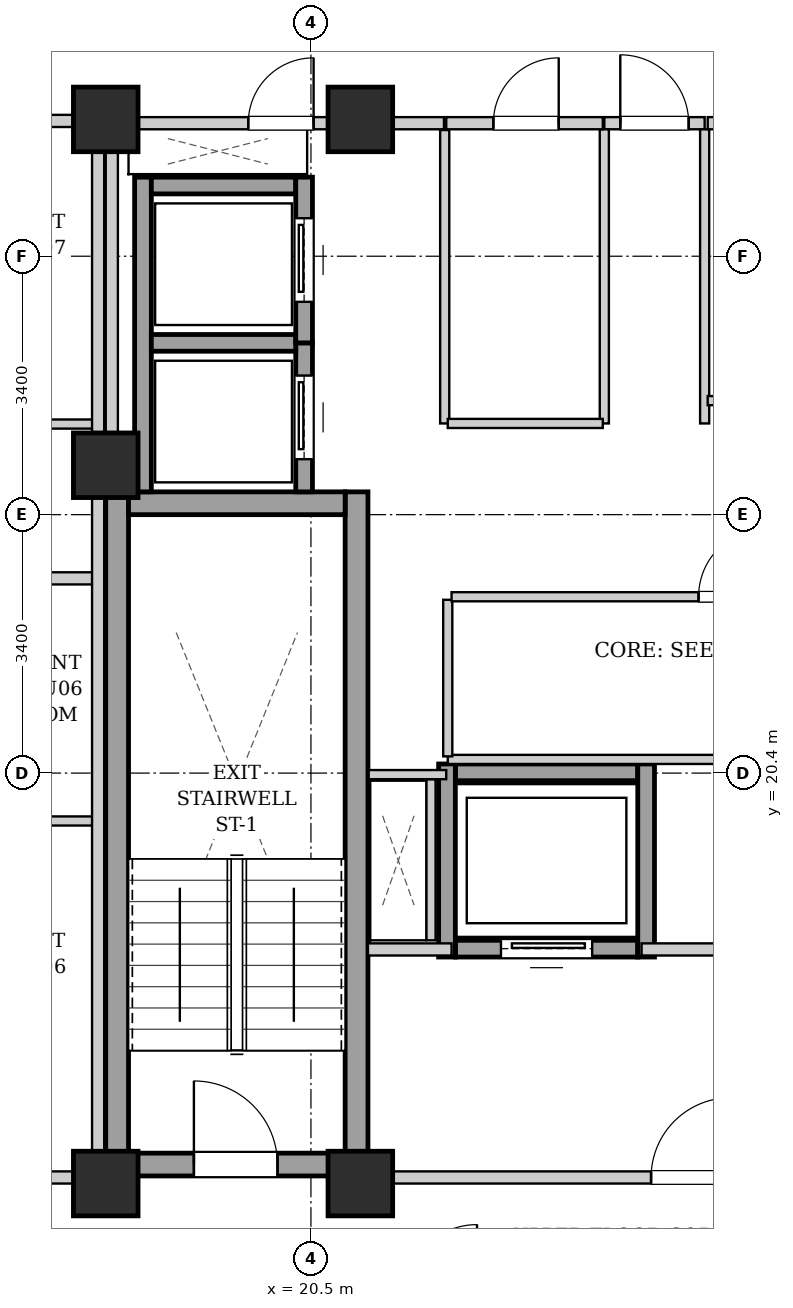
"""IFC4 building model, lengths in metres.
Left out: names, types, materials, properties, quantities, classifications, styles, units other than length and angle.
Written with IfcOpenShell. Run it as: python <this file> out.ifc"""

import sys

from ifc_helpers import new_model, si_unit, direction, frame, frame_2d, origin, origin_2d, place, context, subcontext, project, spatial, rectangle, extrude, element, fill, save


model = new_model("IFC4")
c1 = context("Model", 3, precision=1e-05, world=origin(), true_north=direction((0.0, 1.0)))
c2 = subcontext(c1, "Body", "Model", "MODEL_VIEW")
j1 = project(units=[si_unit("LENGTHUNIT", "METRE"), si_unit("PLANEANGLEUNIT", "RADIAN")], contexts=[c1])
p1 = place(None, origin())
s1 = spatial("IfcSite", under=j1, at=p1, CompositionType="ELEMENT")
p2 = place(p1, origin())
s2 = spatial("IfcBuilding", under=s1, at=p2, CompositionType="ELEMENT")
p3 = place(p2, frame((0.0, 0.0, 207.4)))
s3 = spatial("IfcBuildingStorey", under=s2, at=p3, CompositionType="ELEMENT", Elevation=207.4)
for number, where, z_axis, x_axis in (
    (1, (17.8, 15.0, 0.0), (0.0, 0.0, 1.0), (1.0, 0.0, 0.0)),
    (2, (21.15, 15.0, 0.0), (0.0, 0.0, 1.0), (1.0, 0.0, 0.0)),
    (3, (17.8, 29.0, 0.0), (0.0, 0.0, 1.0), (1.0, 0.0, 0.0)),
    (4, (21.15, 29.0, 0.0), (0.0, 0.0, 1.0), (1.0, 0.0, 0.0)),
    (5, (17.8, 24.45, 0.0), (0.0, 0.0, 1.0), (1.0, 0.0, 0.0)),
):
    element("IfcColumn", number, at=place(p3, frame(where, z_axis=z_axis, x_axis=x_axis)), inside=s3, PredefinedType="COLUMN", context=c2, shape_type="SweptSolid", body=[
        extrude(rectangle(XDim=0.85, YDim=0.85, at=origin_2d()), origin(), (0.0, 0.0, 1.0), 3.3),
    ])
for number, where, z_axis, x_axis in (
    (6, (17.95, 15.1, 0.0), (0.0, 0.0, 1.0), (0.0, 1.0, 0.0)),
    (7, (21.1, 15.1, 0.0), (0.0, 0.0, 1.0), (0.0, 1.0, 0.0)),
):
    element("IfcWall", number, at=place(p3, frame(where, z_axis=z_axis, x_axis=x_axis)), inside=s3, PredefinedType="SHEAR", context=c2, shape_type="SweptSolid", body=[
        extrude(rectangle(XDim=9.0, YDim=0.3, at=frame_2d((4.5, 0.0))), origin(), (0.0, 0.0, 1.0), 3.04),
    ])
p4 = place(p3, frame((18.1, 23.95, 0.0), z_axis=(0.0, 0.0, 1.0), x_axis=(1.0, 0.0, 0.0)))
e8 = element("IfcWall", 8, at=p4, inside=s3, PredefinedType="SHEAR", context=c2, shape_type="SweptSolid", body=[
    extrude(rectangle(XDim=2.85, YDim=0.3, at=frame_2d((1.425, 0.0))), origin(), (0.0, 0.0, 1.0), 3.04),
])
p5 = place(p3, frame((18.1, 15.25, 0.0), z_axis=(0.0, 0.0, 1.0), x_axis=(1.0, 0.0, 0.0)))
e9 = element("IfcWall", 9, at=p5, inside=s3, PredefinedType="SHEAR", context=c2, shape_type="SweptSolid", body=[
    extrude(rectangle(XDim=2.85, YDim=0.3, at=frame_2d((1.425, 0.0))), origin(), (0.0, 0.0, 1.0), 3.04),
])
p6 = place(p5, frame((0.86, 0.0, 0.0)))
e10 = element("IfcOpeningElement", 10, at=p6, cuts=e9, PredefinedType="OPENING", context=c2, shape_type="SweptSolid", body=[
    extrude(rectangle(XDim=1.1, YDim=2.05, at=frame_2d((0.55, 1.025))), frame((0.0, 0.16, 0.0), z_axis=(0.0, -1.0, 0.0), x_axis=(1.0, 0.0, 0.0)), (0.0, 0.0, 1.0), 0.32),
])
p7 = place(p3, frame((18.29, 24.1, 0.0), z_axis=(0.0, 0.0, 1.0), x_axis=(0.0, 1.0, 0.0)))
e11 = element("IfcWall", 11, at=p7, inside=s3, PredefinedType="SHEAR", context=c2, shape_type="SweptSolid", body=[
    extrude(rectangle(XDim=4.14, YDim=0.22, at=frame_2d((2.07, 0.0))), origin(), (0.0, 0.0, 1.0), 3.04),
])
p8 = place(p3, frame((20.41, 24.1, 0.0), z_axis=(0.0, 0.0, 1.0), x_axis=(0.0, 1.0, 0.0)))
e12 = element("IfcWall", 12, at=p8, inside=s3, PredefinedType="SHEAR", context=c2, shape_type="SweptSolid", body=[
    extrude(rectangle(XDim=1.96, YDim=0.22, at=frame_2d((0.98, 0.0))), origin(), (0.0, 0.0, 1.0), 3.04),
])
p9 = place(p8, frame((0.43, 0.0, 0.0)))
e13 = element("IfcOpeningElement", 13, at=p9, cuts=e12, PredefinedType="OPENING", context=c2, shape_type="SweptSolid", body=[
    extrude(rectangle(XDim=1.1, YDim=2.15, at=frame_2d((0.55, 1.075))), frame((0.0, 0.12, 0.0), z_axis=(0.0, -1.0, 0.0), x_axis=(1.0, 0.0, 0.0)), (0.0, 0.0, 1.0), 0.24),
])
for number, where, z_axis, x_axis in (
    (14, (18.4, 26.06, 0.0), (0.0, 0.0, 1.0), (1.0, 0.0, 0.0)),
    (15, (18.4, 28.13, 0.0), (0.0, 0.0, 1.0), (1.0, 0.0, 0.0)),
):
    element("IfcWall", number, at=place(p3, frame(where, z_axis=z_axis, x_axis=x_axis)), inside=s3, PredefinedType="SHEAR", context=c2, shape_type="SweptSolid", body=[
        extrude(rectangle(XDim=1.9, YDim=0.22, at=frame_2d((0.95, 0.0))), origin(), (0.0, 0.0, 1.0), 3.04),
    ])
p10 = place(p3, frame((20.41, 26.06, 0.0), z_axis=(0.0, 0.0, 1.0), x_axis=(0.0, 1.0, 0.0)))
e16 = element("IfcWall", 16, at=p10, inside=s3, PredefinedType="SHEAR", context=c2, shape_type="SweptSolid", body=[
    extrude(rectangle(XDim=2.18, YDim=0.22, at=frame_2d((1.09, 0.0))), origin(), (0.0, 0.0, 1.0), 3.04),
])
p11 = place(p10, frame((0.54, 0.0, 0.0)))
e17 = element("IfcOpeningElement", 17, at=p11, cuts=e16, PredefinedType="OPENING", context=c2, shape_type="SweptSolid", body=[
    extrude(rectangle(XDim=1.1, YDim=2.15, at=frame_2d((0.55, 1.075))), frame((0.0, 0.12, 0.0), z_axis=(0.0, -1.0, 0.0), x_axis=(1.0, 0.0, 0.0)), (0.0, 0.0, 1.0), 0.24),
])
p12 = place(p3, frame((22.4, 18.09, 0.0), z_axis=(0.0, 0.0, 1.0), x_axis=(1.0, 0.0, 0.0)))
e18 = element("IfcWall", 18, at=p12, inside=s3, PredefinedType="SHEAR", context=c2, shape_type="SweptSolid", body=[
    extrude(rectangle(XDim=2.4, YDim=0.22, at=frame_2d((1.2, 0.0))), origin(), (0.0, 0.0, 1.0), 3.04),
])
p13 = place(p12, frame((0.6, 0.0, 0.0)))
e19 = element("IfcOpeningElement", 19, at=p13, cuts=e18, PredefinedType="OPENING", context=c2, shape_type="SweptSolid", body=[
    extrude(rectangle(XDim=1.2, YDim=2.15, at=frame_2d((0.6, 1.075))), frame((0.0, 0.12, 0.0), z_axis=(0.0, -1.0, 0.0), x_axis=(1.0, 0.0, 0.0)), (0.0, 0.0, 1.0), 0.24),
])
p14 = place(p3, frame((22.4, 20.41, 0.0), z_axis=(0.0, 0.0, 1.0), x_axis=(1.0, 0.0, 0.0)))
e20 = element("IfcWall", 20, at=p14, inside=s3, PredefinedType="SHEAR", context=c2, shape_type="SweptSolid", body=[
    extrude(rectangle(XDim=2.4, YDim=0.22, at=frame_2d((1.2, 0.0))), origin(), (0.0, 0.0, 1.0), 3.04),
])
for number, where, z_axis, x_axis in (
    (21, (22.29, 17.98, 0.0), (0.0, 0.0, 1.0), (0.0, 1.0, 0.0)),
    (22, (24.91, 17.98, 0.0), (0.0, 0.0, 1.0), (0.0, 1.0, 0.0)),
):
    element("IfcWall", number, at=place(p3, frame(where, z_axis=z_axis, x_axis=x_axis)), inside=s3, PredefinedType="SHEAR", context=c2, shape_type="SweptSolid", body=[
        extrude(rectangle(XDim=2.54, YDim=0.22, at=frame_2d((1.27, 0.0))), origin(), (0.0, 0.0, 1.0), 3.04),
    ])
p15 = place(p3, frame((21.25, 15.08, 0.0), z_axis=(0.0, 0.0, 1.0), x_axis=(1.0, 0.0, 0.0)))
e23 = element("IfcWall", 23, at=p15, inside=s3, PredefinedType="PARTITIONING", context=c2, shape_type="SweptSolid", body=[
    extrude(rectangle(XDim=8.5, YDim=0.16, at=frame_2d((4.25, 0.0))), origin(), (0.0, 0.0, 1.0), 2.556),
])
p16 = place(p15, frame((3.725, 0.0, 0.0)))
e24 = element("IfcOpeningElement", 24, at=p16, cuts=e23, PredefinedType="OPENING", context=c2, shape_type="SweptSolid", body=[
    extrude(rectangle(XDim=1.05, YDim=2.05, at=frame_2d((0.525, 1.025))), frame((0.0, 0.09, 0.0), z_axis=(0.0, -1.0, 0.0), x_axis=(1.0, 0.0, 0.0)), (0.0, 0.0, 1.0), 0.18),
])
p17 = place(p3, frame((21.25, 18.08, 0.0), z_axis=(0.0, 0.0, 1.0), x_axis=(1.0, 0.0, 0.0)))
e25 = element("IfcWall", 25, at=p17, inside=s3, PredefinedType="PARTITIONING", context=c2, shape_type="SweptSolid", body=[
    extrude(rectangle(XDim=1.1, YDim=0.16, at=frame_2d((0.55, 0.0))), origin(), (0.0, 0.0, 1.0), 3.04),
])
p18 = place(p3, frame((24.85, 18.08, 0.0), z_axis=(0.0, 0.0, 1.0), x_axis=(1.0, 0.0, 0.0)))
e26 = element("IfcWall", 26, at=p18, inside=s3, PredefinedType="PARTITIONING", context=c2, shape_type="SweptSolid", body=[
    extrude(rectangle(XDim=1.3, YDim=0.16, at=frame_2d((0.65, 0.0))), origin(), (0.0, 0.0, 1.0), 3.04),
])
p19 = place(p3, frame((17.88, 24.12, 0.0), z_axis=(0.0, 0.0, 1.0), x_axis=(0.0, 1.0, 0.0)))
e27 = element("IfcWall", 27, at=p19, inside=s3, PredefinedType="PARTITIONING", context=c2, shape_type="SweptSolid", body=[
    extrude(rectangle(XDim=4.76, YDim=0.16, at=frame_2d((2.38, 0.0))), origin(), (0.0, 0.0, 1.0), 2.375),
])
p20 = place(p3, frame((24.36, 28.95, 0.0), z_axis=(0.0, 0.0, 1.0), x_axis=(1.0, 0.0, 0.0)))
e28 = element("IfcWall", 28, at=p20, inside=s3, PredefinedType="PARTITIONING", context=c2, shape_type="SweptSolid", body=[
    extrude(rectangle(XDim=1.32, YDim=0.16, at=frame_2d((0.66, 0.0))), origin(), (0.0, 0.0, 1.0), 2.556),
])
p21 = place(p20, frame((0.21, 0.0, 0.0)))
e29 = element("IfcOpeningElement", 29, at=p21, cuts=e28, PredefinedType="OPENING", context=c2, shape_type="SweptSolid", body=[
    extrude(rectangle(XDim=0.9, YDim=2.05, at=frame_2d((0.45, 1.025))), frame((0.0, 0.09, 0.0), z_axis=(0.0, -1.0, 0.0), x_axis=(1.0, 0.0, 0.0)), (0.0, 0.0, 1.0), 0.18),
])
p22 = place(p3, frame((17.96, 28.95, 0.0), z_axis=(0.0, 0.0, 1.0), x_axis=(1.0, 0.0, 0.0)))
e30 = element("IfcWall", 30, at=p22, inside=s3, PredefinedType="PARTITIONING", context=c2, shape_type="SweptSolid", body=[
    extrude(rectangle(XDim=4.29, YDim=0.16, at=frame_2d((2.145, 0.0))), origin(), (0.0, 0.0, 1.0), 2.556),
])
p23 = place(p22, frame((1.715, 0.0, 0.0)))
e31 = element("IfcOpeningElement", 31, at=p23, cuts=e30, PredefinedType="OPENING", context=c2, shape_type="SweptSolid", body=[
    extrude(rectangle(XDim=0.86, YDim=2.05, at=frame_2d((0.43, 1.025))), frame((0.0, 0.09, 0.0), z_axis=(0.0, -1.0, 0.0), x_axis=(1.0, 0.0, 0.0)), (0.0, 0.0, 1.0), 0.18),
])
p24 = place(p3, frame((22.08, 18.2, 0.0), z_axis=(0.0, 0.0, 1.0), x_axis=(0.0, 1.0, 0.0)))
e32 = element("IfcWall", 32, at=p24, inside=s3, PredefinedType="PARTITIONING", context=c2, shape_type="SweptSolid", body=[
    extrude(rectangle(XDim=2.12, YDim=0.12, at=frame_2d((1.06, 0.0))), origin(), (0.0, 0.0, 1.0), 3.04),
])
p25 = place(p3, frame((22.28, 20.38, 0.0), z_axis=(0.0, 0.0, 1.0), x_axis=(-1.0, 0.0, 0.0)))
e33 = element("IfcWall", 33, at=p25, inside=s3, PredefinedType="PARTITIONING", context=c2, shape_type="SweptSolid", body=[
    extrude(rectangle(XDim=1.02, YDim=0.12, at=frame_2d((0.51, 0.0))), origin(), (0.0, 0.0, 1.0), 3.04),
])
for number, where, z_axis, x_axis in (
    (34, (24.36, 25.0, 0.0), (0.0, 0.0, 1.0), (0.0, 1.0, 0.0)),
    (35, (25.68, 25.0, 0.0), (0.0, 0.0, 1.0), (0.0, 1.0, 0.0)),
):
    element("IfcWall", number, at=place(p3, frame(where, z_axis=z_axis, x_axis=x_axis)), inside=s3, PredefinedType="PARTITIONING", context=c2, shape_type="SweptSolid", body=[
        extrude(rectangle(XDim=3.87, YDim=0.12, at=frame_2d((1.935, 0.0))), origin(), (0.0, 0.0, 1.0), 3.04),
    ])
p26 = place(p3, frame((22.26, 25.0, 0.0), z_axis=(0.0, 0.0, 1.0), x_axis=(0.0, 1.0, 0.0)))
e36 = element("IfcWall", 36, at=p26, inside=s3, PredefinedType="PARTITIONING", context=c2, shape_type="SweptSolid", body=[
    extrude(rectangle(XDim=3.86, YDim=0.12, at=frame_2d((1.93, 0.0))), origin(), (0.0, 0.0, 1.0), 3.04),
])
p27 = place(p3, frame((22.3, 25.0, 0.0), z_axis=(0.0, 0.0, 1.0), x_axis=(1.0, 0.0, 0.0)))
e37 = element("IfcWall", 37, at=p27, inside=s3, PredefinedType="PARTITIONING", context=c2, shape_type="SweptSolid", body=[
    extrude(rectangle(XDim=2.04, YDim=0.12, at=frame_2d((1.02, 0.0))), origin(), (0.0, 0.0, 1.0), 3.04),
])
p28 = place(p3, frame((22.28, 28.95, 0.0), z_axis=(0.0, 0.0, 1.0), x_axis=(1.0, 0.0, 0.0)))
e38 = element("IfcWall", 38, at=p28, inside=s3, PredefinedType="PARTITIONING", context=c2, shape_type="SweptSolid", body=[
    extrude(rectangle(XDim=2.06, YDim=0.16, at=frame_2d((1.03, 0.0))), origin(), (0.0, 0.0, 1.0), 2.556),
])
p29 = place(p28, frame((0.62, 0.0, 0.0)))
e39 = element("IfcOpeningElement", 39, at=p29, cuts=e38, PredefinedType="OPENING", context=c2, shape_type="SweptSolid", body=[
    extrude(rectangle(XDim=0.86, YDim=2.05, at=frame_2d((0.43, 1.025))), frame((0.0, 0.09, 0.0), z_axis=(0.0, -1.0, 0.0), x_axis=(1.0, 0.0, 0.0)), (0.0, 0.0, 1.0), 0.18),
])
p30 = place(p3, frame((25.72, 28.95, 0.0), z_axis=(0.0, 0.0, 1.0), x_axis=(1.0, 0.0, 0.0)))
e40 = element("IfcWall", 40, at=p30, inside=s3, PredefinedType="PARTITIONING", context=c2, shape_type="SweptSolid", body=[
    extrude(rectangle(XDim=4.32, YDim=0.16, at=frame_2d((2.16, 0.0))), origin(), (0.0, 0.0, 1.0), 2.556),
])
p31 = place(p3, frame((25.72, 25.3, 0.0), z_axis=(0.0, 0.0, 1.0), x_axis=(1.0, 0.0, 0.0)))
e41 = element("IfcWall", 41, at=p31, inside=s3, PredefinedType="PARTITIONING", context=c2, shape_type="SweptSolid", body=[
    extrude(rectangle(XDim=4.32, YDim=0.12, at=frame_2d((2.16, 0.0))), origin(), (0.0, 0.0, 1.0), 3.04),
])
p32 = place(p31, frame((1.65, 0.0, 0.0)))
e42 = element("IfcOpeningElement", 42, at=p32, cuts=e41, PredefinedType="OPENING", context=c2, shape_type="SweptSolid", body=[
    extrude(rectangle(XDim=0.9, YDim=2.05, at=frame_2d((0.45, 1.025))), frame((0.0, 0.07, 0.0), z_axis=(0.0, -1.0, 0.0), x_axis=(1.0, 0.0, 0.0)), (0.0, 0.0, 1.0), 0.14),
])
p33 = place(p3, frame((22.3, 20.58, 0.0), z_axis=(0.0, 0.0, 1.0), x_axis=(1.0, 0.0, 0.0)))
e43 = element("IfcWall", 43, at=p33, inside=s3, PredefinedType="PARTITIONING", context=c2, shape_type="SweptSolid", body=[
    extrude(rectangle(XDim=7.35, YDim=0.12, at=frame_2d((3.675, 0.0))), origin(), (0.0, 0.0, 1.0), 3.04),
])
p34 = place(p3, frame((22.3, 20.62, 0.0), z_axis=(0.0, 0.0, 1.0), x_axis=(0.0, 1.0, 0.0)))
e44 = element("IfcWall", 44, at=p34, inside=s3, PredefinedType="PARTITIONING", context=c2, shape_type="SweptSolid", body=[
    extrude(rectangle(XDim=2.06, YDim=0.12, at=frame_2d((1.03, 0.0))), origin(), (0.0, 0.0, 1.0), 3.04),
])
p35 = place(p3, frame((22.35, 22.72, 0.0), z_axis=(0.0, 0.0, 1.0), x_axis=(1.0, 0.0, 0.0)))
e45 = element("IfcWall", 45, at=p35, inside=s3, PredefinedType="PARTITIONING", context=c2, shape_type="SweptSolid", body=[
    extrude(rectangle(XDim=7.27, YDim=0.12, at=frame_2d((3.635, 0.0))), origin(), (0.0, 0.0, 1.0), 3.04),
])
p36 = place(p35, frame((3.25, 0.0, 0.0)))
e46 = element("IfcOpeningElement", 46, at=p36, cuts=e45, PredefinedType="OPENING", context=c2, shape_type="SweptSolid", body=[
    extrude(rectangle(XDim=0.9, YDim=2.05, at=frame_2d((0.45, 1.025))), frame((0.0, 0.07, 0.0), z_axis=(0.0, -1.0, 0.0), x_axis=(1.0, 0.0, 0.0)), (0.0, 0.0, 1.0), 0.14),
])
p37 = place(p3, frame((10.88, 15.08, 0.0), z_axis=(0.0, 0.0, 1.0), x_axis=(1.0, 0.0, 0.0)))
e47 = element("IfcWall", 47, at=p37, inside=s3, PredefinedType="PARTITIONING", context=c2, shape_type="SweptSolid", body=[
    extrude(rectangle(XDim=6.88, YDim=0.16, at=frame_2d((3.44, 0.0))), origin(), (0.0, 0.0, 1.0), 2.556),
])
p38 = place(p37, frame((5.06, 0.0, 0.0)))
e48 = element("IfcOpeningElement", 48, at=p38, cuts=e47, PredefinedType="OPENING", context=c2, shape_type="SweptSolid", body=[
    extrude(rectangle(XDim=0.95, YDim=2.1, at=frame_2d((0.475, 1.05))), frame((0.0, 0.09, 0.0), z_axis=(0.0, -1.0, 0.0), x_axis=(1.0, 0.0, 0.0)), (0.0, 0.0, 1.0), 0.18),
])
p39 = place(p3, frame((10.88, 22.962, 0.0), z_axis=(0.0, 0.0, 1.0), x_axis=(1.0, 0.0, 0.0)))
e49 = element("IfcWall", 49, at=p39, inside=s3, PredefinedType="PARTITIONING", context=c2, shape_type="SweptSolid", body=[
    extrude(rectangle(XDim=6.76, YDim=0.16, at=frame_2d((3.38, 0.0))), origin(), (0.0, 0.0, 1.0), 3.04),
])
p40 = place(p3, frame((15.19, 19.77, 0.0), z_axis=(0.0, 0.0, 1.0), x_axis=(1.0, 0.0, 0.0)))
e50 = element("IfcWall", 50, at=p40, inside=s3, PredefinedType="PARTITIONING", context=c2, shape_type="SweptSolid", body=[
    extrude(rectangle(XDim=2.45, YDim=0.12, at=frame_2d((1.225, 0.0))), origin(), (0.0, 0.0, 1.0), 3.04),
])
p41 = place(p40, frame((0.795, 0.0, 0.0)))
e51 = element("IfcOpeningElement", 51, at=p41, cuts=e50, PredefinedType="OPENING", context=c2, shape_type="SweptSolid", body=[
    extrude(rectangle(XDim=0.86, YDim=2.05, at=frame_2d((0.43, 1.025))), frame((0.0, 0.07, 0.0), z_axis=(0.0, -1.0, 0.0), x_axis=(1.0, 0.0, 0.0)), (0.0, 0.0, 1.0), 0.14),
])
p42 = place(p3, frame((10.88, 28.98, 0.0), z_axis=(0.0, 0.0, 1.0), x_axis=(1.0, 0.0, 0.0)))
e52 = element("IfcWall", 52, at=p42, inside=s3, PredefinedType="PARTITIONING", context=c2, shape_type="SweptSolid", body=[
    extrude(rectangle(XDim=6.88, YDim=0.16, at=frame_2d((3.44, 0.0))), origin(), (0.0, 0.0, 1.0), 2.556),
])
p43 = place(p42, frame((5.06, 0.0, 0.0)))
e53 = element("IfcOpeningElement", 53, at=p43, cuts=e52, PredefinedType="OPENING", context=c2, shape_type="SweptSolid", body=[
    extrude(rectangle(XDim=0.95, YDim=2.1, at=frame_2d((0.475, 1.05))), frame((0.0, 0.09, 0.0), z_axis=(0.0, -1.0, 0.0), x_axis=(1.0, 0.0, 0.0)), (0.0, 0.0, 1.0), 0.18),
])
p44 = place(p3, frame((15.19, 24.992, 0.0), z_axis=(0.0, 0.0, 1.0), x_axis=(1.0, 0.0, 0.0)))
e54 = element("IfcWall", 54, at=p44, inside=s3, PredefinedType="PARTITIONING", context=c2, shape_type="SweptSolid", body=[
    extrude(rectangle(XDim=2.45, YDim=0.12, at=frame_2d((1.225, 0.0))), origin(), (0.0, 0.0, 1.0), 3.04),
])
p45 = place(p44, frame((0.795, 0.0, 0.0)))
e55 = element("IfcOpeningElement", 55, at=p45, cuts=e54, PredefinedType="OPENING", context=c2, shape_type="SweptSolid", body=[
    extrude(rectangle(XDim=0.86, YDim=2.05, at=frame_2d((0.43, 1.025))), frame((0.0, 0.07, 0.0), z_axis=(0.0, -1.0, 0.0), x_axis=(1.0, 0.0, 0.0)), (0.0, 0.0, 1.0), 0.14),
])
p46 = place(p3, frame((17.7, 15.02, 0.0), z_axis=(0.0, 0.0, 1.0), x_axis=(0.0, 1.0, 0.0)))
e56 = element("IfcWall", 56, at=p46, inside=s3, PredefinedType="PARTITIONING", context=c2, shape_type="SweptSolid", body=[
    extrude(rectangle(XDim=13.98, YDim=0.16, at=frame_2d((6.99, 0.0))), origin(), (0.0, 0.0, 1.0), 2.375),
])
p47 = place(p6, origin())
e57 = element("IfcDoor", 57, at=p47, inside=s3, OperationType="SINGLE_SWING_LEFT", PredefinedType="DOOR", context=c2, shape_type="SweptSolid", body=[
    extrude(rectangle(XDim=1.1, YDim=2.05, at=frame_2d((0.55, 1.025))), frame((0.0, 0.025, 0.0), z_axis=(0.0, -1.0, 0.0), x_axis=(1.0, 0.0, 0.0)), (0.0, 0.0, 1.0), 0.05),
])
fill(e10, e57)
p48 = place(p9, origin())
e58 = element("IfcDoor", 58, at=p48, inside=s3, OperationType="SLIDING_TO_LEFT", PredefinedType="DOOR", context=c2, shape_type="SweptSolid", body=[
    extrude(rectangle(XDim=1.1, YDim=2.15, at=frame_2d((0.55, 1.075))), frame((0.0, 0.025, 0.0), z_axis=(0.0, -1.0, 0.0), x_axis=(1.0, 0.0, 0.0)), (0.0, 0.0, 1.0), 0.05),
])
fill(e13, e58)
p49 = place(p11, origin())
e59 = element("IfcDoor", 59, at=p49, inside=s3, OperationType="SLIDING_TO_LEFT", PredefinedType="DOOR", context=c2, shape_type="SweptSolid", body=[
    extrude(rectangle(XDim=1.1, YDim=2.15, at=frame_2d((0.55, 1.075))), frame((0.0, 0.025, 0.0), z_axis=(0.0, -1.0, 0.0), x_axis=(1.0, 0.0, 0.0)), (0.0, 0.0, 1.0), 0.05),
])
fill(e17, e59)
p50 = place(p13, origin())
e60 = element("IfcDoor", 60, at=p50, inside=s3, OperationType="SLIDING_TO_LEFT", PredefinedType="DOOR", context=c2, shape_type="SweptSolid", body=[
    extrude(rectangle(XDim=1.2, YDim=2.15, at=frame_2d((0.6, 1.075))), frame((0.0, 0.025, 0.0), z_axis=(0.0, -1.0, 0.0), x_axis=(1.0, 0.0, 0.0)), (0.0, 0.0, 1.0), 0.05),
])
fill(e19, e60)
p51 = place(p16, origin())
e61 = element("IfcDoor", 61, at=p51, inside=s3, OperationType="SINGLE_SWING_RIGHT", PredefinedType="DOOR", context=c2, shape_type="SweptSolid", body=[
    extrude(rectangle(XDim=1.05, YDim=2.05, at=frame_2d((0.525, 1.025))), frame((0.0, 0.025, 0.0), z_axis=(0.0, -1.0, 0.0), x_axis=(1.0, 0.0, 0.0)), (0.0, 0.0, 1.0), 0.05),
])
fill(e24, e61)
p52 = place(p21, origin())
e62 = element("IfcDoor", 62, at=p52, inside=s3, OperationType="SINGLE_SWING_LEFT", PredefinedType="DOOR", context=c2, shape_type="SweptSolid", body=[
    extrude(rectangle(XDim=0.9, YDim=2.05, at=frame_2d((0.45, 1.025))), frame((0.0, 0.025, 0.0), z_axis=(0.0, -1.0, 0.0), x_axis=(1.0, 0.0, 0.0)), (0.0, 0.0, 1.0), 0.05),
])
fill(e29, e62)
p53 = place(p23, origin())
e63 = element("IfcDoor", 63, at=p53, inside=s3, OperationType="SINGLE_SWING_RIGHT", PredefinedType="DOOR", context=c2, shape_type="SweptSolid", body=[
    extrude(rectangle(XDim=0.86, YDim=2.05, at=frame_2d((0.43, 1.025))), frame((0.0, 0.025, 0.0), z_axis=(0.0, -1.0, 0.0), x_axis=(1.0, 0.0, 0.0)), (0.0, 0.0, 1.0), 0.05),
])
fill(e31, e63)
p54 = place(p29, origin())
e64 = element("IfcDoor", 64, at=p54, inside=s3, OperationType="SINGLE_SWING_RIGHT", PredefinedType="DOOR", context=c2, shape_type="SweptSolid", body=[
    extrude(rectangle(XDim=0.86, YDim=2.05, at=frame_2d((0.43, 1.025))), frame((0.0, 0.025, 0.0), z_axis=(0.0, -1.0, 0.0), x_axis=(1.0, 0.0, 0.0)), (0.0, 0.0, 1.0), 0.05),
])
fill(e39, e64)
p55 = place(p36, origin())
e65 = element("IfcDoor", 65, at=p55, inside=s3, OperationType="SINGLE_SWING_RIGHT", PredefinedType="DOOR", context=c2, shape_type="SweptSolid", body=[
    extrude(rectangle(XDim=0.9, YDim=2.05, at=frame_2d((0.45, 1.025))), frame((0.0, 0.025, 0.0), z_axis=(0.0, -1.0, 0.0), x_axis=(1.0, 0.0, 0.0)), (0.0, 0.0, 1.0), 0.05),
])
fill(e46, e65)
save(model, sys.argv[1])
